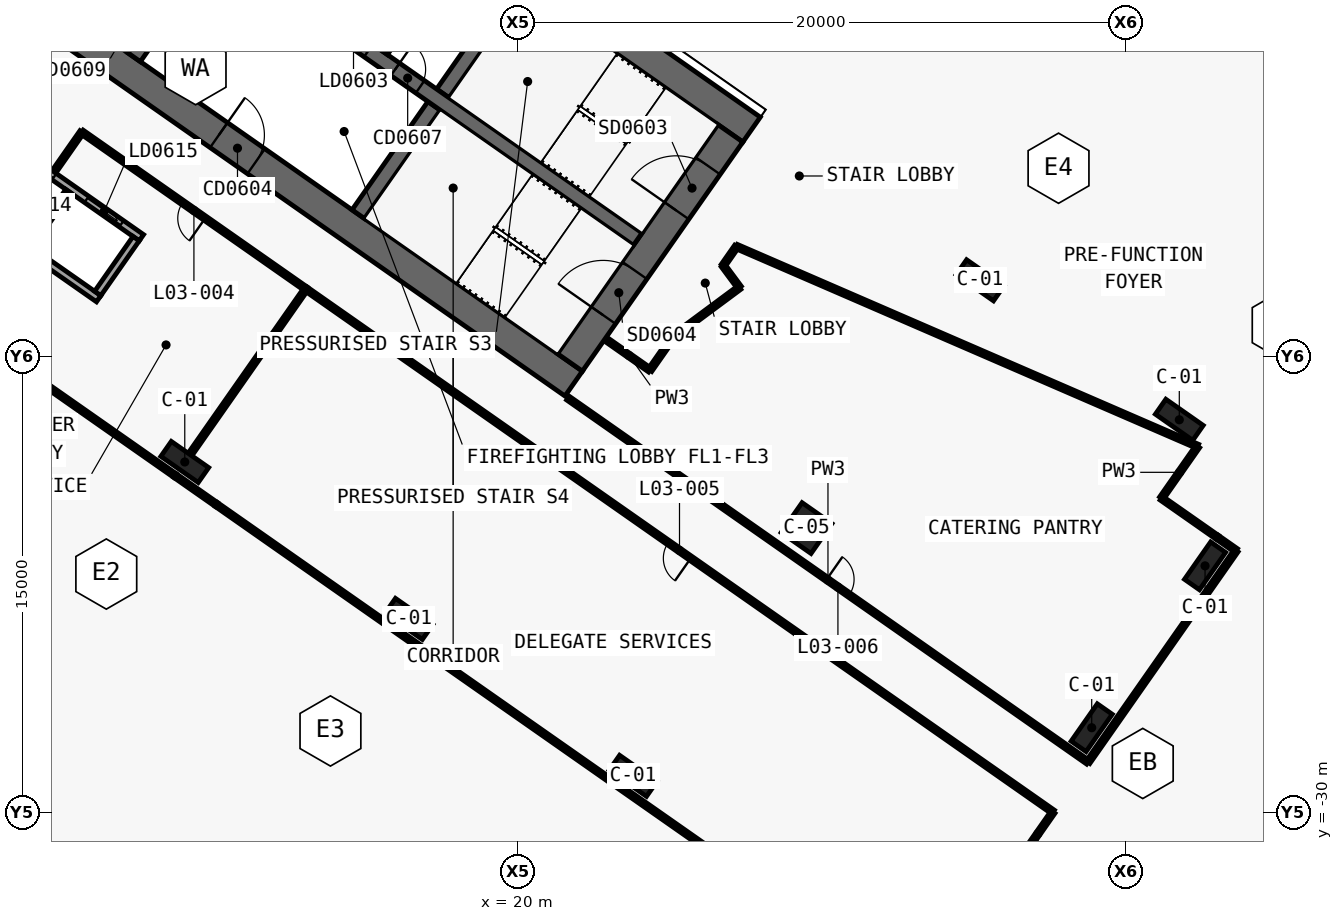
"""IFC4 building model, lengths in metres.
Left out: names, types, materials, properties, quantities, classifications, styles, units other than length and angle.
Written with IfcOpenShell. Run it as: python <this file> out.ifc"""

import sys

from ifc_helpers import new_model, si_unit, direction, frame, frame_2d, origin, origin_2d, place, context, subcontext, project, spatial, polyline, rectangle, outline, extrude, element, fill, save


model = new_model("IFC4")
c1 = context("Model", 3, precision=1e-05, world=origin(), true_north=direction((0.0, 1.0)))
c2 = subcontext(c1, "Body", "Model", "MODEL_VIEW")
j1 = project(units=[si_unit("LENGTHUNIT", "METRE"), si_unit("PLANEANGLEUNIT", "RADIAN")], contexts=[c1])
p1 = place(None, origin())
s1 = spatial("IfcSite", under=j1, at=p1, CompositionType="ELEMENT")
p2 = place(p1, origin())
s2 = spatial("IfcBuilding", under=s1, at=p2, CompositionType="ELEMENT")
p3 = place(p2, frame((0.0, 0.0, 26.0)))
s3 = spatial("IfcBuildingStorey", under=s2, at=p3, CompositionType="ELEMENT", Elevation=26.0)
p4 = place(p3, frame((-0.037, 11.867, 0.0), z_axis=(0.0, 0.0, 1.0), x_axis=(0.819155306259, -0.573571777746, 0.0)))
e1 = element("IfcWall", 1, at=p4, inside=s3, PredefinedType="SHEAR", context=c2, shape_type="SweptSolid", body=[
    extrude(outline(polyline([(33.837, 0.5), (0.0, 0.5), (0.7, -0.5), (33.837, -0.5), (33.837, 0.5)])), origin(), (0.0, 0.0, 1.0), 6.0),
])
p5 = place(p3, frame((-0.037, -0.585, 0.0), z_axis=(0.0, 0.0, 1.0), x_axis=(0.819157152511, -0.573569140985, 0.0)))
e2 = element("IfcWall", 2, at=p5, inside=s3, PredefinedType="SHEAR", context=c2, shape_type="SweptSolid", body=[
    extrude(outline(polyline([(26.695, 0.5), (0.0, 0.5), (0.7, -0.5), (26.695, -0.5), (26.695, 0.5)])), origin(), (0.0, 0.0, 1.0), 6.0),
])
p6 = place(p5, frame((1.245, 0.0, 0.0)))
e3 = element("IfcOpeningElement", 3, at=p6, cuts=e2, PredefinedType="OPENING", context=c2, shape_type="SweptSolid", body=[
    extrude(rectangle(XDim=1.5, YDim=2.1, at=frame_2d((0.75, 1.05))), frame((0.0, 0.51, 0.0), z_axis=(0.0, -1.0, 0.0), x_axis=(1.0, 0.0, 0.0)), (0.0, 0.0, 1.0), 1.02),
])
p7 = place(p5, frame((12.445, 0.0, 0.0)))
e4 = element("IfcOpeningElement", 4, at=p7, cuts=e2, PredefinedType="OPENING", context=c2, shape_type="SweptSolid", body=[
    extrude(rectangle(XDim=1.5, YDim=2.1, at=frame_2d((0.75, 1.05))), frame((0.0, 0.51, 0.0), z_axis=(0.0, -1.0, 0.0), x_axis=(1.0, 0.0, 0.0)), (0.0, 0.0, 1.0), 1.02),
])
p8 = place(p3, frame((21.708, -15.2, 0.0), z_axis=(0.0, 0.0, 1.0), x_axis=(0.573576324356, 0.819152122709, 0.0)))
e5 = element("IfcWall", 5, at=p8, inside=s3, PredefinedType="SHEAR", context=c2, shape_type="SweptSolid", body=[
    extrude(outline(polyline([(9.2, 0.5), (0.0, 0.5), (0.0, -0.5), (9.2, -0.5), (9.2, 0.5)])), origin(), (0.0, 0.0, 1.0), 6.0),
])
p9 = place(p8, frame((6.1, 0.0, 0.0)))
e6 = element("IfcOpeningElement", 6, at=p9, cuts=e5, PredefinedType="OPENING", context=c2, shape_type="SweptSolid", body=[
    extrude(rectangle(XDim=1.8, YDim=2.1, at=frame_2d((0.9, 1.05))), frame((0.0, 0.51, 0.0), z_axis=(0.0, -1.0, 0.0), x_axis=(1.0, 0.0, 0.0)), (0.0, 0.0, 1.0), 1.02),
])
p10 = place(p8, frame((1.9, 0.0, 0.0)))
e7 = element("IfcOpeningElement", 7, at=p10, cuts=e5, PredefinedType="OPENING", context=c2, shape_type="SweptSolid", body=[
    extrude(rectangle(XDim=1.8, YDim=2.1, at=frame_2d((0.9, 1.05))), frame((0.0, 0.51, 0.0), z_axis=(0.0, -1.0, 0.0), x_axis=(1.0, 0.0, 0.0)), (0.0, 0.0, 1.0), 1.02),
])
p11 = place(p3, frame((7.372, -5.162, 0.0), z_axis=(0.0, 0.0, 1.0), x_axis=(0.573594173421, 0.819139624372, 0.0)))
e8 = element("IfcWall", 8, at=p11, inside=s3, PredefinedType="SHEAR", context=c2, shape_type="SweptSolid", body=[
    extrude(outline(polyline([(0.0, 0.25), (0.0, -0.25), (4.35, -0.25), (4.35, 0.25), (0.0, 0.25)])), origin(), (0.0, 0.0, 1.0), 6.0),
])
p12 = place(p3, frame((14.745, -10.324, 0.0), z_axis=(0.0, 0.0, 1.0), x_axis=(0.57356780395, 0.819158088694, 0.0)))
e9 = element("IfcWall", 9, at=p12, inside=s3, PredefinedType="SHEAR", context=c2, shape_type="SweptSolid", body=[
    extrude(outline(polyline([(0.0, 0.25), (0.0, -0.25), (4.35, -0.25), (4.35, 0.25), (0.0, 0.25)])), origin(), (0.0, 0.0, 1.0), 6.0),
])
p13 = place(p3, frame((17.527, -6.352, 0.0), z_axis=(0.0, 0.0, 1.0), x_axis=(0.573530143085, 0.819184457233, 0.0)))
e10 = element("IfcWall", 10, at=p13, inside=s3, PredefinedType="SHEAR", context=c2, shape_type="SweptSolid", body=[
    extrude(outline(polyline([(4.35, -0.25), (4.35, 0.25), (0.0, 0.25), (0.0, -0.25), (4.35, -0.25)])), origin(), (0.0, 0.0, 1.0), 6.0),
])
p14 = place(p3, frame((2.638, 3.768, 0.0), z_axis=(0.0, 0.0, 1.0), x_axis=(0.819148977158, -0.573580816643, 0.0)))
e11 = element("IfcWall", 11, at=p14, inside=s3, PredefinedType="SHEAR", context=c2, shape_type="SweptSolid", body=[
    extrude(outline(polyline([(0.0, 0.25), (0.0, -0.25), (26.0, -0.25), (26.0, 0.25), (0.0, 0.25)])), origin(), (0.0, 0.0, 1.0), 6.0),
])
p15 = place(p14, frame((9.637, 0.0, 0.0)))
e12 = element("IfcOpeningElement", 12, at=p15, cuts=e11, PredefinedType="OPENING", context=c2, shape_type="SweptSolid", body=[
    extrude(rectangle(XDim=1.2, YDim=2.1, at=frame_2d((0.6, 1.05))), frame((0.0, 0.26, 0.0), z_axis=(0.0, -1.0, 0.0), x_axis=(1.0, 0.0, 0.0)), (0.0, 0.0, 1.0), 0.52),
])
p16 = place(p14, frame((11.812, 0.0, 0.0)))
e13 = element("IfcOpeningElement", 13, at=p16, cuts=e11, PredefinedType="OPENING", context=c2, shape_type="SweptSolid", body=[
    extrude(rectangle(XDim=1.2, YDim=2.1, at=frame_2d((0.6, 1.05))), frame((0.0, 0.26, 0.0), z_axis=(0.0, -1.0, 0.0), x_axis=(1.0, 0.0, 0.0)), (0.0, 0.0, 1.0), 0.52),
])
p17 = place(p14, frame((13.988, 0.0, 0.0)))
e14 = element("IfcOpeningElement", 14, at=p17, cuts=e11, PredefinedType="OPENING", context=c2, shape_type="SweptSolid", body=[
    extrude(rectangle(XDim=1.2, YDim=2.1, at=frame_2d((0.6, 1.05))), frame((0.0, 0.26, 0.0), z_axis=(0.0, -1.0, 0.0), x_axis=(1.0, 0.0, 0.0)), (0.0, 0.0, 1.0), 0.52),
])
p18 = place(p14, frame((16.262, 0.0, 0.0)))
e15 = element("IfcOpeningElement", 15, at=p18, cuts=e11, PredefinedType="OPENING", context=c2, shape_type="SweptSolid", body=[
    extrude(rectangle(XDim=1.0, YDim=2.1, at=frame_2d((0.5, 1.05))), frame((0.0, 0.26, 0.0), z_axis=(0.0, -1.0, 0.0), x_axis=(1.0, 0.0, 0.0)), (0.0, 0.0, 1.0), 0.52),
])
for number, where, z_axis, x_axis in (
    (16, (9.038, -18.475, 0.0), (0.0, 0.0, 1.0), (0.819, -0.574, 0.0)),
    (17, (16.41, -23.637, 0.0), (0.0, 0.0, 1.0), (0.819, -0.574, 0.0)),
    (18, (23.782, -28.799, 0.0), (0.0, 0.0, 1.0), (0.819, -0.574, 0.0)),
    (19, (35.197, -12.498, 0.0), (0.0, 0.0, 1.0), (0.819, -0.574, 0.0)),
    (20, (41.75, -17.087, 0.0), (0.0, 0.0, 1.0), (0.819, -0.574, 0.0)),
    (21, (38.869, -27.216, 0.0), (0.0, 0.0, 1.0), (0.574, 0.819, 0.0)),
    (22, (42.597, -21.892, 0.0), (0.0, 0.0, 1.0), (0.574, 0.819, 0.0)),
):
    element("IfcColumn", number, at=place(p3, frame(where, z_axis=z_axis, x_axis=x_axis)), inside=s3, PredefinedType="COLUMN", context=c2, shape_type="SweptSolid", body=[
        extrude(rectangle(XDim=1.5, YDim=0.6, at=origin_2d()), origin(), (0.0, 0.0, 1.0), 6.0),
    ])
p19 = place(p3, frame((29.49, -20.649, 0.0), z_axis=(0.0, 0.0, 1.0), x_axis=(0.819152044289, -0.573576436351, 0.0)))
e23 = element("IfcColumn", 23, at=p19, inside=s3, PredefinedType="COLUMN", context=c2, shape_type="SweptSolid", body=[
    extrude(rectangle(XDim=1.2, YDim=1.2, at=origin_2d()), origin(), (0.0, 0.0, 1.0), 6.0),
])
p20 = place(p3, frame((15.622, -5.018, 0.0), z_axis=(0.0, 0.0, 1.0), x_axis=(0.573594173421, 0.819139624372, 0.0)))
e24 = element("IfcWall", 24, at=p20, inside=s3, PredefinedType="SOLIDWALL", context=c2, shape_type="SweptSolid", body=[
    extrude(rectangle(XDim=4.35, YDim=0.2, at=frame_2d((2.175, 0.0))), origin(), (0.0, 0.0, 1.0), 6.0),
])
p21 = place(p3, frame((-2.887, -6.738, 0.0), z_axis=(0.0, 0.0, 1.0), x_axis=(0.819150280716, -0.573578954985, 0.0)))
e25 = element("IfcWall", 25, at=p21, inside=s3, PredefinedType="SOLIDWALL", context=c2, shape_type="SweptSolid", body=[
    extrude(rectangle(XDim=11.1, YDim=0.25, at=frame_2d((5.55, 0.0))), origin(), (0.0, 0.0, 1.0), 6.0),
])
p22 = place(p3, frame((-1.481, -4.731, 0.0), z_axis=(0.0, 0.0, 1.0), x_axis=(0.819150280716, -0.573578954985, 0.0)))
e26 = element("IfcWall", 26, at=p22, inside=s3, PredefinedType="SOLIDWALL", context=c2, shape_type="SweptSolid", body=[
    extrude(rectangle(XDim=11.1, YDim=0.25, at=frame_2d((5.55, 0.0))), origin(), (0.0, 0.0, 1.0), 6.0),
])
p23 = place(p22, frame((0.8, 0.0, 0.0)))
e27 = element("IfcOpeningElement", 27, at=p23, cuts=e26, PredefinedType="OPENING", context=c2, shape_type="SweptSolid", body=[
    extrude(rectangle(XDim=1.4, YDim=2.1, at=frame_2d((0.7, 1.05))), frame((0.0, 0.135, 0.0), z_axis=(0.0, -1.0, 0.0), x_axis=(1.0, 0.0, 0.0)), (0.0, 0.0, 1.0), 0.27),
])
p24 = place(p22, frame((3.5, 0.0, 0.0)))
e28 = element("IfcOpeningElement", 28, at=p24, cuts=e26, PredefinedType="OPENING", context=c2, shape_type="SweptSolid", body=[
    extrude(rectangle(XDim=1.4, YDim=2.1, at=frame_2d((0.7, 1.05))), frame((0.0, 0.135, 0.0), z_axis=(0.0, -1.0, 0.0), x_axis=(1.0, 0.0, 0.0)), (0.0, 0.0, 1.0), 0.27),
])
p25 = place(p22, frame((6.2, 0.0, 0.0)))
e29 = element("IfcOpeningElement", 29, at=p25, cuts=e26, PredefinedType="OPENING", context=c2, shape_type="SweptSolid", body=[
    extrude(rectangle(XDim=1.4, YDim=2.1, at=frame_2d((0.7, 1.05))), frame((0.0, 0.135, 0.0), z_axis=(0.0, -1.0, 0.0), x_axis=(1.0, 0.0, 0.0)), (0.0, 0.0, 1.0), 0.27),
])
p26 = place(p22, frame((8.9, 0.0, 0.0)))
e30 = element("IfcOpeningElement", 30, at=p26, cuts=e26, PredefinedType="OPENING", context=c2, shape_type="SweptSolid", body=[
    extrude(rectangle(XDim=1.4, YDim=2.1, at=frame_2d((0.7, 1.05))), frame((0.0, 0.135, 0.0), z_axis=(0.0, -1.0, 0.0), x_axis=(1.0, 0.0, 0.0)), (0.0, 0.0, 1.0), 0.27),
])
p27 = place(p3, frame((6.175, -12.93, 0.0), z_axis=(0.0, 0.0, 1.0), x_axis=(0.573559170999, 0.819164133348, 0.0)))
e31 = element("IfcWall", 31, at=p27, inside=s3, PredefinedType="SOLIDWALL", context=c2, shape_type="SweptSolid", body=[
    extrude(rectangle(XDim=2.2, YDim=0.25, at=frame_2d((1.1, 0.0))), origin(), (0.0, 0.0, 1.0), 6.0),
])
p28 = place(p3, frame((3.943, -11.367, 0.0), z_axis=(0.0, 0.0, 1.0), x_axis=(0.573507030513, 0.819200638399, 0.0)))
e32 = element("IfcWall", 32, at=p28, inside=s3, PredefinedType="SOLIDWALL", context=c2, shape_type="SweptSolid", body=[
    extrude(rectangle(XDim=2.2, YDim=0.2, at=frame_2d((1.1, 0.0))), origin(), (0.0, 0.0, 1.0), 6.0),
])
p29 = place(p3, frame((21.642, -16.375, 0.0), z_axis=(0.0, 0.0, 1.0), x_axis=(0.819148965066, -0.573580833911, 0.0)))
e33 = element("IfcWall", 33, at=p29, inside=s3, PredefinedType="PARTITIONING", context=c2, shape_type="SweptSolid", body=[
    extrude(rectangle(XDim=20.88, YDim=0.15, at=frame_2d((10.44, 0.0))), origin(), (0.0, 0.0, 1.0), 4.18),
])
p30 = place(p29, frame((10.39, 0.0, 0.0)))
e34 = element("IfcOpeningElement", 34, at=p30, cuts=e33, PredefinedType="OPENING", context=c2, shape_type="SweptSolid", body=[
    extrude(rectangle(XDim=0.9, YDim=2.1, at=frame_2d((0.45, 1.05))), frame((0.0, 0.085, 0.0), z_axis=(0.0, -1.0, 0.0), x_axis=(1.0, 0.0, 0.0)), (0.0, 0.0, 1.0), 0.17),
])
p31 = place(p3, frame((13.026, -12.783, 0.0), z_axis=(0.0, 0.0, 1.0), x_axis=(-0.81915291695, 0.57357519006, 0.0)))
e35 = element("IfcWall", 35, at=p31, inside=s3, PredefinedType="PARTITIONING", context=c2, shape_type="SweptSolid", body=[
    extrude(rectangle(XDim=9.002, YDim=0.15, at=frame_2d((4.501, 0.0))), origin(), (0.0, 0.0, 1.0), 4.18),
])
p32 = place(p31, frame((4.051, 0.0, 0.0)))
e36 = element("IfcOpeningElement", 36, at=p32, cuts=e35, PredefinedType="OPENING", context=c2, shape_type="SweptSolid", body=[
    extrude(rectangle(XDim=0.9, YDim=2.1, at=frame_2d((0.45, 1.05))), frame((0.0, 0.085, 0.0), z_axis=(0.0, -1.0, 0.0), x_axis=(1.0, 0.0, 0.0)), (0.0, 0.0, 1.0), 0.17),
])
p33 = place(p3, frame((37.599, -29.989, 0.0), z_axis=(0.0, 0.0, 1.0), x_axis=(-0.819154688631, 0.57357265982, 0.0)))
e37 = element("IfcWall", 37, at=p33, inside=s3, PredefinedType="PARTITIONING", context=c2, shape_type="SweptSolid", body=[
    extrude(rectangle(XDim=30.002, YDim=0.15, at=frame_2d((15.001, 0.0))), origin(), (0.0, 0.0, 1.0), 4.18),
])
p34 = place(p33, frame((14.551, 0.0, 0.0)))
e38 = element("IfcOpeningElement", 38, at=p34, cuts=e37, PredefinedType="OPENING", context=c2, shape_type="SweptSolid", body=[
    extrude(rectangle(XDim=0.9, YDim=2.1, at=frame_2d((0.45, 1.05))), frame((0.0, 0.085, 0.0), z_axis=(0.0, -1.0, 0.0), x_axis=(1.0, 0.0, 0.0)), (0.0, 0.0, 1.0), 0.17),
])
p35 = place(p3, frame((42.357, -17.962, 0.0), z_axis=(0.0, 0.0, 1.0), x_axis=(-0.573533201177, -0.819182316183, 0.0)))
e39 = element("IfcWall", 39, at=p35, inside=s3, PredefinedType="PARTITIONING", context=c2, shape_type="SweptSolid", body=[
    extrude(rectangle(XDim=2.081, YDim=0.15, at=frame_2d((1.041, 0.0))), origin(), (0.0, 0.0, 1.0), 4.38),
])
p36 = place(p3, frame((41.164, -19.667, 0.0), z_axis=(0.0, 0.0, 1.0), x_axis=(0.81912956014, -0.573608545704, 0.0)))
e40 = element("IfcWall", 40, at=p36, inside=s3, PredefinedType="PARTITIONING", context=c2, shape_type="SweptSolid", body=[
    extrude(rectangle(XDim=2.241, YDim=0.15, at=frame_2d((1.121, 0.0))), origin(), (0.0, 0.0, 1.0), 4.38),
])
p37 = place(p3, frame((42.998, -20.952, 0.0), z_axis=(0.0, 0.0, 1.0), x_axis=(0.819141432686, -0.573591590992, 0.0)))
e41 = element("IfcWall", 41, at=p37, inside=s3, PredefinedType="PARTITIONING", context=c2, shape_type="SweptSolid", body=[
    extrude(rectangle(XDim=0.76, YDim=0.15, at=frame_2d((0.38, 0.0))), origin(), (0.0, 0.0, 1.0), 5.6),
])
p38 = place(p3, frame((43.621, -21.388, 0.0), z_axis=(0.0, 0.0, 1.0), x_axis=(-0.57357799764, -0.819150951061, 0.0)))
e42 = element("IfcWall", 42, at=p38, inside=s3, PredefinedType="PARTITIONING", context=c2, shape_type="SweptSolid", body=[
    extrude(rectangle(XDim=8.5, YDim=0.15, at=frame_2d((4.25, 0.0))), origin(), (0.0, 0.0, 1.0), 5.6),
])
p39 = place(p3, frame((26.746, -12.014, 0.0), z_axis=(0.0, 0.0, 1.0), x_axis=(0.573761975376, 0.819022097146, 0.0)))
e43 = element("IfcWall", 43, at=p39, inside=s3, PredefinedType="PARTITIONING", context=c2, shape_type="SweptSolid", body=[
    extrude(rectangle(XDim=0.765, YDim=0.15, at=frame_2d((0.383, 0.0))), origin(), (0.0, 0.0, 1.0), 5.6),
])
p40 = place(p3, frame((27.185, -11.387, 0.0), z_axis=(0.0, 0.0, 1.0), x_axis=(0.917531384635, -0.397663372979, 0.0)))
e44 = element("IfcWall", 44, at=p40, inside=s3, PredefinedType="PARTITIONING", context=c2, shape_type="SweptSolid", body=[
    extrude(rectangle(XDim=16.536, YDim=0.15, at=frame_2d((8.268, 0.0))), origin(), (0.0, 0.0, 1.0), 4.18),
])
p41 = place(p3, frame((22.961, -14.49, 0.0), z_axis=(0.0, 0.0, 1.0), x_axis=(0.819109000826, -0.573637903879, 0.0)))
e45 = element("IfcWall", 45, at=p41, inside=s3, PredefinedType="PARTITIONING", context=c2, shape_type="SweptSolid", body=[
    extrude(rectangle(XDim=1.68, YDim=0.15, at=frame_2d((0.84, 0.0))), origin(), (0.0, 0.0, 1.0), 5.6),
])
p42 = place(p3, frame((24.337, -15.454, 0.0), z_axis=(0.0, 0.0, 1.0), x_axis=(0.573571252353, 0.819155674139, 0.0)))
e46 = element("IfcWall", 46, at=p42, inside=s3, PredefinedType="PARTITIONING", context=c2, shape_type="SweptSolid", body=[
    extrude(rectangle(XDim=1.354, YDim=0.15, at=frame_2d((0.677, 0.0))), origin(), (0.0, 0.0, 1.0), 5.6),
])
p43 = place(p3, frame((25.114, -14.345, 0.0), z_axis=(0.0, 0.0, 1.0), x_axis=(0.803211070557, 0.595694532571, 0.0)))
e47 = element("IfcWall", 47, at=p43, inside=s3, PredefinedType="PARTITIONING", context=c2, shape_type="SweptSolid", body=[
    extrude(rectangle(XDim=2.7, YDim=0.15, at=frame_2d((1.35, 0.0))), origin(), (0.0, 0.0, 1.0), 5.6),
])
p44 = place(p3, frame((27.282, -12.737, 0.0), z_axis=(0.0, 0.0, 1.0), x_axis=(-0.595869495235, 0.803081281471, 0.0)))
e48 = element("IfcWall", 48, at=p44, inside=s3, PredefinedType="PARTITIONING", context=c2, shape_type="SweptSolid", body=[
    extrude(rectangle(XDim=0.9, YDim=0.15, at=frame_2d((0.45, 0.0))), origin(), (0.0, 0.0, 1.0), 5.6),
])
p45 = place(p3, frame((13.024, -12.782, 0.0), z_axis=(0.0, 0.0, 1.0), x_axis=(-0.573556251799, -0.819166177294, 0.0)))
e49 = element("IfcWall", 49, at=p45, inside=s3, PredefinedType="PARTITIONING", context=c2, shape_type="SweptSolid", body=[
    extrude(rectangle(XDim=6.63, YDim=0.15, at=frame_2d((3.315, 0.0))), origin(), (0.0, 0.0, 1.0), 4.18),
])
p46 = place(p3, frame((8.722, -18.926, 0.0), z_axis=(0.0, 0.0, 1.0), x_axis=(-0.819141427692, 0.573591598124, 0.0)))
e50 = element("IfcWall", 50, at=p46, inside=s3, PredefinedType="PARTITIONING", context=c2, shape_type="SweptSolid", body=[
    extrude(rectangle(XDim=9.0, YDim=0.15, at=frame_2d((4.5, 0.0))), origin(), (0.0, 0.0, 1.0), 5.6),
])
p47 = place(p3, frame((4.763, -8.889, 0.0), z_axis=(0.0, 0.0, 1.0), x_axis=(0.573494057365, 0.819209720504, 0.0)))
e51 = element("IfcWall", 51, at=p47, inside=s3, PredefinedType="PARTITIONING", context=c2, shape_type="SweptSolid", body=[
    extrude(rectangle(XDim=1.55, YDim=0.15, at=frame_2d((0.775, 0.0))), origin(), (0.0, 0.0, 1.0), 4.18),
])
p48 = place(p3, frame((30.839, -34.412, 0.0), z_axis=(0.0, 0.0, 1.0), x_axis=(-0.819153188106, 0.573574802808, 0.0)))
e52 = element("IfcWall", 52, at=p48, inside=s3, PredefinedType="PARTITIONING", context=c2, shape_type="SweptSolid", body=[
    extrude(rectangle(XDim=25.351, YDim=0.15, at=frame_2d((12.675, 0.0))), origin(), (0.0, 0.0, 1.0), 5.6),
])
p49 = place(p3, frame((37.599, -29.989, 0.0), z_axis=(0.0, 0.0, 1.0), x_axis=(-0.573575034625, -0.819153025786, 0.0)))
e53 = element("IfcWall", 53, at=p49, inside=s3, PredefinedType="PARTITIONING", context=c2, shape_type="SweptSolid", body=[
    extrude(rectangle(XDim=1.745, YDim=0.15, at=frame_2d((0.872, 0.0))), origin(), (0.0, 0.0, 1.0), 5.6),
])
p50 = place(p3, frame((10.075, -19.873, 0.0), z_axis=(0.0, 0.0, 1.0), x_axis=(-0.819190252408, 0.573521865634, 0.0)))
e54 = element("IfcWall", 54, at=p50, inside=s3, PredefinedType="PARTITIONING", context=c2, shape_type="SweptSolid", body=[
    extrude(rectangle(XDim=1.652, YDim=0.15, at=frame_2d((0.826, 0.0))), origin(), (0.0, 0.0, 1.0), 4.58),
])
p51 = place(p18, origin())
e55 = element("IfcDoor", 55, at=p51, inside=s3, OperationType="SINGLE_SWING_RIGHT", PredefinedType="DOOR", context=c2, shape_type="SweptSolid", body=[
    extrude(rectangle(XDim=1.0, YDim=2.1, at=frame_2d((0.5, 1.05))), frame((0.0, 0.025, 0.0), z_axis=(0.0, -1.0, 0.0), x_axis=(1.0, 0.0, 0.0)), (0.0, 0.0, 1.0), 0.05),
])
fill(e15, e55)
p52 = place(p7, origin())
e56 = element("IfcDoor", 56, at=p52, inside=s3, OperationType="DOUBLE_DOOR_SINGLE_SWING", PredefinedType="DOOR", context=c2, shape_type="SweptSolid", body=[
    extrude(rectangle(XDim=1.5, YDim=2.1, at=frame_2d((0.75, 1.05))), frame((0.0, 0.025, 0.0), z_axis=(0.0, -1.0, 0.0), x_axis=(1.0, 0.0, 0.0)), (0.0, 0.0, 1.0), 0.05),
])
fill(e4, e56)
p53 = place(p9, origin())
e57 = element("IfcDoor", 57, at=p53, inside=s3, OperationType="DOUBLE_DOOR_SINGLE_SWING", PredefinedType="DOOR", context=c2, shape_type="SweptSolid", body=[
    extrude(rectangle(XDim=1.8, YDim=2.1, at=frame_2d((0.9, 1.05))), frame((0.0, 0.025, 0.0), z_axis=(0.0, -1.0, 0.0), x_axis=(1.0, 0.0, 0.0)), (0.0, 0.0, 1.0), 0.05),
])
fill(e6, e57)
p54 = place(p10, origin())
e58 = element("IfcDoor", 58, at=p54, inside=s3, OperationType="DOUBLE_DOOR_SINGLE_SWING", PredefinedType="DOOR", context=c2, shape_type="SweptSolid", body=[
    extrude(rectangle(XDim=1.8, YDim=2.1, at=frame_2d((0.9, 1.05))), frame((0.0, 0.025, 0.0), z_axis=(0.0, -1.0, 0.0), x_axis=(1.0, 0.0, 0.0)), (0.0, 0.0, 1.0), 0.05),
])
fill(e7, e58)
p55 = place(p25, origin())
e59 = element("IfcDoor", 59, at=p55, inside=s3, OperationType="SLIDING_TO_LEFT", PredefinedType="DOOR", context=c2, shape_type="SweptSolid", body=[
    extrude(rectangle(XDim=1.4, YDim=2.1, at=frame_2d((0.7, 1.05))), frame((0.0, 0.025, 0.0), z_axis=(0.0, -1.0, 0.0), x_axis=(1.0, 0.0, 0.0)), (0.0, 0.0, 1.0), 0.05),
])
fill(e29, e59)
p56 = place(p26, origin())
e60 = element("IfcDoor", 60, at=p56, inside=s3, OperationType="SLIDING_TO_RIGHT", PredefinedType="DOOR", context=c2, shape_type="SweptSolid", body=[
    extrude(rectangle(XDim=1.4, YDim=2.1, at=frame_2d((0.7, 1.05))), frame((0.0, 0.025, 0.0), z_axis=(0.0, -1.0, 0.0), x_axis=(1.0, 0.0, 0.0)), (0.0, 0.0, 1.0), 0.05),
])
fill(e30, e60)
p57 = place(p32, origin())
e61 = element("IfcDoor", 61, at=p57, inside=s3, OperationType="SINGLE_SWING_LEFT", PredefinedType="DOOR", context=c2, shape_type="SweptSolid", body=[
    extrude(rectangle(XDim=0.9, YDim=2.1, at=frame_2d((0.45, 1.05))), frame((0.0, 0.025, 0.0), z_axis=(0.0, -1.0, 0.0), x_axis=(1.0, 0.0, 0.0)), (0.0, 0.0, 1.0), 0.05),
])
fill(e36, e61)
p58 = place(p34, origin())
e62 = element("IfcDoor", 62, at=p58, inside=s3, OperationType="SINGLE_SWING_LEFT", PredefinedType="DOOR", context=c2, shape_type="SweptSolid", body=[
    extrude(rectangle(XDim=0.9, YDim=2.1, at=frame_2d((0.45, 1.05))), frame((0.0, 0.025, 0.0), z_axis=(0.0, -1.0, 0.0), x_axis=(1.0, 0.0, 0.0)), (0.0, 0.0, 1.0), 0.05),
])
fill(e38, e62)
p59 = place(p30, origin())
e63 = element("IfcDoor", 63, at=p59, inside=s3, OperationType="SINGLE_SWING_RIGHT", PredefinedType="DOOR", context=c2, shape_type="SweptSolid", body=[
    extrude(rectangle(XDim=0.9, YDim=2.1, at=frame_2d((0.45, 1.05))), frame((0.0, 0.025, 0.0), z_axis=(0.0, -1.0, 0.0), x_axis=(1.0, 0.0, 0.0)), (0.0, 0.0, 1.0), 0.05),
])
fill(e34, e63)
save(model, sys.argv[1])
